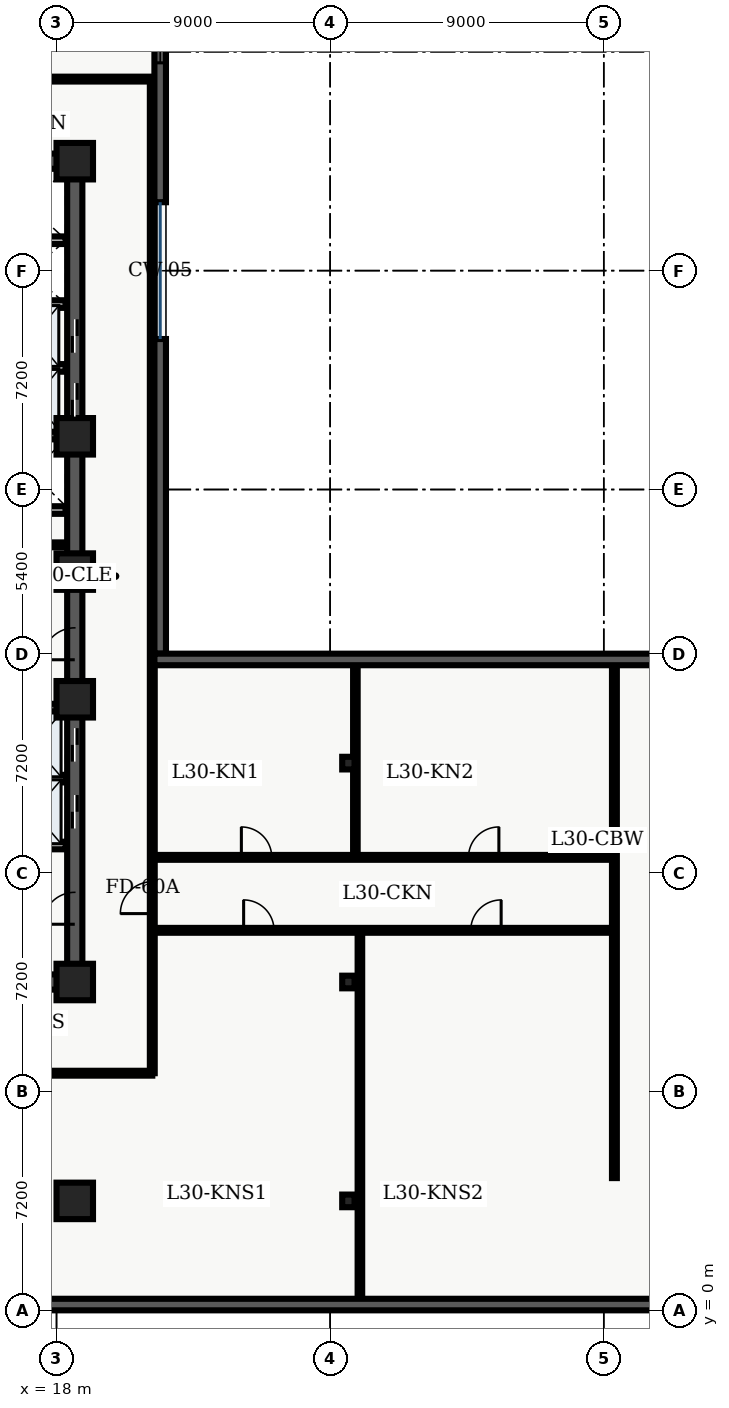
"""IFC4 building model, lengths in metres.
Left out: names, types, materials, properties, quantities, classifications, styles, units other than length and angle.
Written with IfcOpenShell. Run it as: python <this file> out.ifc"""

import sys

from ifc_helpers import new_model, entity, si_unit, converted_unit, direction, frame, origin_with_axes, origin_2d_with_axis, place, context, subcontext, project, spatial, polyline, rectangle, i_section, outline, extrude, element, fill, save


model = new_model("IFC4")
c1 = context("Model", 3, precision=1e-05, world=origin_with_axes(), true_north=direction((0.0, 1.0)))
c2 = subcontext(c1, "Body", "Model", "MODEL_VIEW")
j1 = project(units=[si_unit("LENGTHUNIT", "METRE"), converted_unit("PLANEANGLEUNIT", "DEGREE", entity("IfcPlaneAngleMeasure", 0.017), si_unit("PLANEANGLEUNIT", "RADIAN"), dimensions=[0, 0, 0, 0, 0, 0, 0])], contexts=[c1])
p1 = place(None, origin_with_axes())
s1 = spatial("IfcSite", under=j1, at=p1, CompositionType="ELEMENT")
p2 = place(p1, origin_with_axes())
s2 = spatial("IfcBuilding", under=s1, at=p2, CompositionType="ELEMENT")
p3 = place(p2, frame((0.0, 0.0, 124.2), z_axis=(0.0, 0.0, 1.0), x_axis=(1.0, 0.0, 0.0)))
s3 = spatial("IfcBuildingStorey", under=s2, at=p3, CompositionType="ELEMENT", Elevation=124.2)
p4 = place(p3, frame((11.4, 10.8, 0.0), z_axis=(0.0, 0.0, 1.0), x_axis=(1.0, 0.0, 0.0)))
e1 = element("IfcWall", 1, at=p4, inside=s3, PredefinedType="SHEAR", context=c2, shape_type="SweptSolid", body=[
    extrude(outline(polyline([(0.0, -0.25), (7.2, -0.25), (7.2, 0.25), (0.0, 0.25), (0.0, -0.25)])), origin_with_axes(), (0.0, 0.0, 1.0), 4.56),
])
p5 = place(p4, frame((2.625, 0.0, 0.0), z_axis=(0.0, 0.0, 1.0), x_axis=(1.0, 0.0, 0.0)))
e2 = element("IfcOpeningElement", 2, at=p5, cuts=e1, PredefinedType="OPENING", context=c2, shape_type="SweptSolid", body=[
    extrude(rectangle(XDim=1.05, YDim=0.52, at=origin_2d_with_axis()), origin_with_axes(), (0.0, 0.0, 1.0), 2.15),
])
p6 = place(p3, frame((11.4, 37.8, 0.0), z_axis=(0.0, 0.0, 1.0), x_axis=(1.0, 0.0, 0.0)))
e3 = element("IfcWall", 3, at=p6, inside=s3, PredefinedType="SHEAR", context=c2, shape_type="SweptSolid", body=[
    extrude(outline(polyline([(0.0, -0.25), (7.2, -0.25), (7.2, 0.25), (0.0, 0.25), (0.0, -0.25)])), origin_with_axes(), (0.0, 0.0, 1.0), 4.56),
])
p7 = place(p6, frame((2.625, 0.0, 0.0), z_axis=(0.0, 0.0, 1.0), x_axis=(1.0, 0.0, 0.0)))
e4 = element("IfcOpeningElement", 4, at=p7, cuts=e3, PredefinedType="OPENING", context=c2, shape_type="SweptSolid", body=[
    extrude(rectangle(XDim=1.05, YDim=0.52, at=origin_2d_with_axis()), origin_with_axes(), (0.0, 0.0, 1.0), 2.15),
])
p8 = place(p3, frame((18.6, 10.8, 0.0), z_axis=(0.0, 0.0, 1.0), x_axis=(0.0, 1.0, 0.0)))
e5 = element("IfcWall", 5, at=p8, inside=s3, PredefinedType="SHEAR", context=c2, shape_type="SweptSolid", body=[
    extrude(outline(polyline([(0.0, -0.25), (13.5, -0.25), (13.5, 0.25), (0.0, 0.25), (0.0, -0.25)])), origin_with_axes(), (0.0, 0.0, 1.0), 4.56),
])
p9 = place(p8, frame((5.6, 0.0, 0.0), z_axis=(0.0, 0.0, 1.0), x_axis=(1.0, 0.0, 0.0)))
e6 = element("IfcOpeningElement", 6, at=p9, cuts=e5, PredefinedType="OPENING", context=c2, shape_type="SweptSolid", body=[
    extrude(rectangle(XDim=1.1, YDim=0.52, at=origin_2d_with_axis()), origin_with_axes(), (0.0, 0.0, 1.0), 2.15),
])
p10 = place(p8, frame((7.8, 0.0, 0.0), z_axis=(0.0, 0.0, 1.0), x_axis=(1.0, 0.0, 0.0)))
e7 = element("IfcOpeningElement", 7, at=p10, cuts=e5, PredefinedType="OPENING", context=c2, shape_type="SweptSolid", body=[
    extrude(rectangle(XDim=1.1, YDim=0.52, at=origin_2d_with_axis()), origin_with_axes(), (0.0, 0.0, 1.0), 2.15),
])
p11 = place(p8, frame((11.125, 0.0, 0.0), z_axis=(0.0, 0.0, 1.0), x_axis=(1.0, 0.0, 0.0)))
e8 = element("IfcOpeningElement", 8, at=p11, cuts=e5, PredefinedType="OPENING", context=c2, shape_type="SweptSolid", body=[
    extrude(rectangle(XDim=1.05, YDim=0.52, at=origin_2d_with_axis()), origin_with_axes(), (0.0, 0.0, 1.0), 2.15),
])
p12 = place(p8, frame((2.425, 0.0, 0.0), z_axis=(0.0, 0.0, 1.0), x_axis=(1.0, 0.0, 0.0)))
e9 = element("IfcOpeningElement", 9, at=p12, cuts=e5, PredefinedType="OPENING", context=c2, shape_type="SweptSolid", body=[
    extrude(rectangle(XDim=1.05, YDim=0.52, at=origin_2d_with_axis()), origin_with_axes(), (0.0, 0.0, 1.0), 2.15),
])
p13 = place(p3, frame((18.6, 24.3, 0.0), z_axis=(0.0, 0.0, 1.0), x_axis=(0.0, 1.0, 0.0)))
e10 = element("IfcWall", 10, at=p13, inside=s3, PredefinedType="SHEAR", context=c2, shape_type="SweptSolid", body=[
    extrude(outline(polyline([(0.0, -0.25), (13.5, -0.25), (13.5, 0.25), (0.0, 0.25), (0.0, -0.25)])), origin_with_axes(), (0.0, 0.0, 1.0), 4.56),
])
p14 = place(p13, frame((5.65, 0.0, 0.0), z_axis=(0.0, 0.0, 1.0), x_axis=(1.0, 0.0, 0.0)))
e11 = element("IfcOpeningElement", 11, at=p14, cuts=e10, PredefinedType="OPENING", context=c2, shape_type="SweptSolid", body=[
    extrude(rectangle(XDim=1.1, YDim=0.52, at=origin_2d_with_axis()), origin_with_axes(), (0.0, 0.0, 1.0), 2.15),
])
p15 = place(p13, frame((7.75, 0.0, 0.0), z_axis=(0.0, 0.0, 1.0), x_axis=(1.0, 0.0, 0.0)))
e12 = element("IfcOpeningElement", 12, at=p15, cuts=e10, PredefinedType="OPENING", context=c2, shape_type="SweptSolid", body=[
    extrude(rectangle(XDim=1.1, YDim=0.52, at=origin_2d_with_axis()), origin_with_axes(), (0.0, 0.0, 1.0), 2.15),
])
for number, where, z_axis, x_axis in (
    (13, (11.65, 19.825, 0.0), (0.0, 0.0, 1.0), (1.0, 0.0, 0.0)),
    (14, (11.65, 28.775, 0.0), (0.0, 0.0, 1.0), (1.0, 0.0, 0.0)),
):
    element("IfcWall", number, at=place(p3, frame(where, z_axis=z_axis, x_axis=x_axis)), inside=s3, PredefinedType="SHEAR", context=c2, shape_type="SweptSolid", body=[
        extrude(outline(polyline([(0.0, -0.125), (6.7, -0.125), (6.7, 0.125), (0.0, 0.125), (0.0, -0.125)])), origin_with_axes(), (0.0, 0.0, 1.0), 4.56),
    ])
p16 = place(p3, frame((11.7, 24.1, 0.0), z_axis=(0.0, 0.0, 1.0), x_axis=(1.0, 0.0, 0.0)))
e15 = element("IfcWall", 15, at=p16, inside=s3, PredefinedType="SOLIDWALL", context=c2, shape_type="SweptSolid", body=[
    extrude(outline(polyline([(0.0, -0.125), (6.6, -0.125), (6.6, 0.125), (0.0, 0.125), (0.0, -0.125)])), origin_with_axes(), (0.0, 0.0, 1.0), 3.6),
])
p17 = place(p16, frame((3.75, 0.0, 0.0), z_axis=(0.0, 0.0, 1.0), x_axis=(1.0, 0.0, 0.0)))
e16 = element("IfcOpeningElement", 16, at=p17, cuts=e15, PredefinedType="OPENING", context=c2, shape_type="SweptSolid", body=[
    extrude(rectangle(XDim=0.9, YDim=0.27, at=origin_2d_with_axis()), origin_with_axes(), (0.0, 0.0, 1.0), 2.15),
])
p18 = place(p3, frame((11.7, 26.325, 0.0), z_axis=(0.0, 0.0, 1.0), x_axis=(1.0, 0.0, 0.0)))
e17 = element("IfcWall", 17, at=p18, inside=s3, PredefinedType="SOLIDWALL", context=c2, shape_type="SweptSolid", body=[
    extrude(outline(polyline([(0.0, -0.125), (6.6, -0.125), (6.6, 0.125), (0.0, 0.125), (0.0, -0.125)])), origin_with_axes(), (0.0, 0.0, 1.0), 3.6),
])
p19 = place(p18, frame((3.5, 0.0, 0.0), z_axis=(0.0, 0.0, 1.0), x_axis=(1.0, 0.0, 0.0)))
e18 = element("IfcOpeningElement", 18, at=p19, cuts=e17, PredefinedType="OPENING", context=c2, shape_type="SweptSolid", body=[
    extrude(rectangle(XDim=0.9, YDim=0.27, at=origin_2d_with_axis()), origin_with_axes(), (0.0, 0.0, 1.0), 2.15),
])
for number, where, z_axis, x_axis in (
    (19, (18.6, 3.6, 0.0), (0.0, 0.0, 1.0), (1.0, 0.0, 0.0)),
    (20, (18.6, 10.8, 0.0), (0.0, 0.0, 1.0), (1.0, 0.0, 0.0)),
    (21, (18.6, 20.1, 0.0), (0.0, 0.0, 1.0), (1.0, 0.0, 0.0)),
    (22, (18.6, 24.3, 0.0), (0.0, 0.0, 1.0), (1.0, 0.0, 0.0)),
    (23, (18.6, 28.75, 0.0), (0.0, 0.0, 1.0), (1.0, 0.0, 0.0)),
    (24, (18.6, 37.8, 0.0), (0.0, 0.0, 1.0), (1.0, 0.0, 0.0)),
):
    element("IfcColumn", number, at=place(p3, frame(where, z_axis=z_axis, x_axis=x_axis)), inside=s3, PredefinedType="COLUMN", context=c2, shape_type="SweptSolid", body=[
        extrude(rectangle(XDim=1.2, YDim=1.2, at=origin_2d_with_axis()), origin_with_axes(), (0.0, 0.0, 1.0), 4.8),
    ])
for number, where, z_axis, x_axis in (
    (25, (27.6, 3.6, 0.0), (0.0, 0.0, 1.0), (1.0, 0.0, 0.0)),
    (26, (27.6, 10.8, 0.0), (0.0, 0.0, 1.0), (1.0, 0.0, 0.0)),
    (27, (27.6, 18.0, 0.0), (0.0, 0.0, 1.0), (1.0, 0.0, 0.0)),
):
    element("IfcColumn", number, at=place(p3, frame(where, z_axis=z_axis, x_axis=x_axis)), inside=s3, PredefinedType="COLUMN", context=c2, shape_type="SweptSolid", body=[
        extrude(i_section(OverallWidth=0.406, OverallDepth=0.416, WebThickness=0.03, FlangeThickness=0.048, FilletRadius=0.022, at=origin_2d_with_axis()), origin_with_axes(), (0.0, 0.0, 1.0), 4.8),
    ])
p20 = place(p3, frame((14.62, 25.18, 0.0), z_axis=(0.0, 0.0, 1.0), x_axis=(1.0, 0.0, 0.0)))
e28 = element("IfcWall", 28, at=p20, inside=s3, PredefinedType="PARTITIONING", context=c2, shape_type="SweptSolid", body=[
    extrude(outline(polyline([(0.0, -0.08), (3.68, -0.08), (3.68, 0.08), (0.0, 0.08), (0.0, -0.08)])), origin_with_axes(), (0.0, 0.0, 1.0), 3.2),
])
p21 = place(p20, frame((1.95, 0.0, 0.0), z_axis=(0.0, 0.0, 1.0), x_axis=(1.0, 0.0, 0.0)))
e29 = element("IfcOpeningElement", 29, at=p21, cuts=e28, PredefinedType="OPENING", context=c2, shape_type="SweptSolid", body=[
    extrude(rectangle(XDim=0.9, YDim=0.18, at=origin_2d_with_axis()), origin_with_axes(), (0.0, 0.0, 1.0), 2.15),
])
for number, where, z_axis, x_axis in (
    (30, (15.84, 15.29, 0.0), (0.0, 0.0, 1.0), (1.0, 0.0, 0.0)),
    (31, (15.84, 17.49, 0.0), (0.0, 0.0, 1.0), (1.0, 0.0, 0.0)),
    (32, (15.84, 31.0, 0.0), (0.0, 0.0, 1.0), (1.0, 0.0, 0.0)),
    (33, (15.84, 33.1, 0.0), (0.0, 0.0, 1.0), (1.0, 0.0, 0.0)),
    (34, (15.84, 35.2, 0.0), (0.0, 0.0, 1.0), (1.0, 0.0, 0.0)),
):
    element("IfcWall", number, at=place(p3, frame(where, z_axis=z_axis, x_axis=x_axis)), inside=s3, PredefinedType="SOLIDWALL", context=c2, shape_type="SweptSolid", body=[
        extrude(outline(polyline([(0.0, -0.125), (2.46, -0.125), (2.46, 0.125), (0.0, 0.125), (0.0, -0.125)])), origin_with_axes(), (0.0, 0.0, 1.0), 3.2),
    ])
p22 = place(p3, frame((2.6, 7.8, 0.0), z_axis=(0.0, 0.0, 1.0), x_axis=(1.0, 0.0, 0.0)))
e35 = element("IfcWall", 35, at=p22, inside=s3, PredefinedType="PARTITIONING", context=c2, shape_type="SweptSolid", body=[
    extrude(outline(polyline([(0.0, -0.08), (18.55, -0.08), (18.55, 0.08), (0.0, 0.08), (0.0, -0.08)])), origin_with_axes(), (0.0, 0.0, 1.0), 3.2),
])
p23 = place(p22, frame((3.684, 0.0, 0.0), z_axis=(0.0, 0.0, 1.0), x_axis=(1.0, 0.0, 0.0)))
e36 = element("IfcOpeningElement", 36, at=p23, cuts=e35, PredefinedType="OPENING", context=c2, shape_type="SweptSolid", body=[
    extrude(rectangle(XDim=1.0, YDim=0.18, at=origin_2d_with_axis()), origin_with_axes(), (0.0, 0.0, 1.0), 2.15),
])
p24 = place(p22, frame((13.22, 0.0, 0.0), z_axis=(0.0, 0.0, 1.0), x_axis=(1.0, 0.0, 0.0)))
e37 = element("IfcOpeningElement", 37, at=p24, cuts=e35, PredefinedType="OPENING", context=c2, shape_type="SweptSolid", body=[
    extrude(rectangle(XDim=1.0, YDim=0.18, at=origin_2d_with_axis()), origin_with_axes(), (0.0, 0.0, 1.0), 2.15),
])
p25 = place(p3, frame((2.6, 40.5, 0.0), z_axis=(0.0, 0.0, 1.0), x_axis=(1.0, 0.0, 0.0)))
e38 = element("IfcWall", 38, at=p25, inside=s3, PredefinedType="PARTITIONING", context=c2, shape_type="SweptSolid", body=[
    extrude(outline(polyline([(0.0, -0.08), (18.65, -0.08), (18.65, 0.08), (0.0, 0.08), (0.0, -0.08)])), origin_with_axes(), (0.0, 0.0, 1.0), 3.2),
])
p26 = place(p25, frame((4.395, 0.0, 0.0), z_axis=(0.0, 0.0, 1.0), x_axis=(1.0, 0.0, 0.0)))
e39 = element("IfcOpeningElement", 39, at=p26, cuts=e38, PredefinedType="OPENING", context=c2, shape_type="SweptSolid", body=[
    extrude(rectangle(XDim=1.0, YDim=0.18, at=origin_2d_with_axis()), origin_with_axes(), (0.0, 0.0, 1.0), 2.15),
])
p27 = place(p25, frame((12.61, 0.0, 0.0), z_axis=(0.0, 0.0, 1.0), x_axis=(1.0, 0.0, 0.0)))
e40 = element("IfcOpeningElement", 40, at=p27, cuts=e38, PredefinedType="OPENING", context=c2, shape_type="SweptSolid", body=[
    extrude(rectangle(XDim=1.0, YDim=0.18, at=origin_2d_with_axis()), origin_with_axes(), (0.0, 0.0, 1.0), 2.15),
])
p28 = place(p3, frame((21.15, 7.8, 0.0), z_axis=(0.0, 0.0, 1.0), x_axis=(0.0, 1.0, 0.0)))
e41 = element("IfcWall", 41, at=p28, inside=s3, PredefinedType="PARTITIONING", context=c2, shape_type="SweptSolid", body=[
    extrude(outline(polyline([(0.0, -0.08), (32.7, -0.08), (32.7, 0.08), (0.0, 0.08), (0.0, -0.08)])), origin_with_axes(), (0.0, 0.0, 1.0), 3.2),
])
p29 = place(p28, frame((5.775, 0.0, 0.0), z_axis=(0.0, 0.0, 1.0), x_axis=(1.0, 0.0, 0.0)))
e42 = element("IfcOpeningElement", 42, at=p29, cuts=e41, PredefinedType="OPENING", context=c2, shape_type="SweptSolid", body=[
    extrude(rectangle(XDim=1.05, YDim=0.18, at=origin_2d_with_axis()), origin_with_axes(), (0.0, 0.0, 1.0), 2.15),
])
p30 = place(p3, frame((21.15, 12.5, 0.0), z_axis=(0.0, 0.0, 1.0), x_axis=(1.0, 0.0, 0.0)))
e43 = element("IfcWall", 43, at=p30, inside=s3, PredefinedType="PARTITIONING", context=c2, shape_type="SweptSolid", body=[
    extrude(outline(polyline([(0.0, -0.08), (15.2, -0.08), (15.2, 0.08), (0.0, 0.08), (0.0, -0.08)])), origin_with_axes(), (0.0, 0.0, 1.0), 3.2),
])
p31 = place(p30, frame((3.505, 0.0, 0.0), z_axis=(0.0, 0.0, 1.0), x_axis=(1.0, 0.0, 0.0)))
e44 = element("IfcOpeningElement", 44, at=p31, cuts=e43, PredefinedType="OPENING", context=c2, shape_type="SweptSolid", body=[
    extrude(rectangle(XDim=1.0, YDim=0.18, at=origin_2d_with_axis()), origin_with_axes(), (0.0, 0.0, 1.0), 2.15),
])
p32 = place(p30, frame((10.975, 0.0, 0.0), z_axis=(0.0, 0.0, 1.0), x_axis=(1.0, 0.0, 0.0)))
e45 = element("IfcOpeningElement", 45, at=p32, cuts=e43, PredefinedType="OPENING", context=c2, shape_type="SweptSolid", body=[
    extrude(rectangle(XDim=1.0, YDim=0.18, at=origin_2d_with_axis()), origin_with_axes(), (0.0, 0.0, 1.0), 2.15),
])
p33 = place(p3, frame((21.15, 14.9, 0.0), z_axis=(0.0, 0.0, 1.0), x_axis=(1.0, 0.0, 0.0)))
e46 = element("IfcWall", 46, at=p33, inside=s3, PredefinedType="PARTITIONING", context=c2, shape_type="SweptSolid", body=[
    extrude(outline(polyline([(0.0, -0.08), (15.2, -0.08), (15.2, 0.08), (0.0, 0.08), (0.0, -0.08)])), origin_with_axes(), (0.0, 0.0, 1.0), 3.2),
])
p34 = place(p33, frame((3.43, 0.0, 0.0), z_axis=(0.0, 0.0, 1.0), x_axis=(1.0, 0.0, 0.0)))
e47 = element("IfcOpeningElement", 47, at=p34, cuts=e46, PredefinedType="OPENING", context=c2, shape_type="SweptSolid", body=[
    extrude(rectangle(XDim=1.0, YDim=0.18, at=origin_2d_with_axis()), origin_with_axes(), (0.0, 0.0, 1.0), 2.15),
])
p35 = place(p33, frame((10.9, 0.0, 0.0), z_axis=(0.0, 0.0, 1.0), x_axis=(1.0, 0.0, 0.0)))
e48 = element("IfcOpeningElement", 48, at=p35, cuts=e46, PredefinedType="OPENING", context=c2, shape_type="SweptSolid", body=[
    extrude(rectangle(XDim=1.0, YDim=0.18, at=origin_2d_with_axis()), origin_with_axes(), (0.0, 0.0, 1.0), 2.15),
])
p36 = place(p3, frame((36.35, 4.35, 0.0), z_axis=(0.0, 0.0, 1.0), x_axis=(0.0, 1.0, 0.0)))
e49 = element("IfcWall", 49, at=p36, inside=s3, PredefinedType="PARTITIONING", context=c2, shape_type="SweptSolid", body=[
    extrude(outline(polyline([(0.0, -0.08), (16.95, -0.08), (16.95, 0.08), (0.0, 0.08), (0.0, -0.08)])), origin_with_axes(), (0.0, 0.0, 1.0), 3.2),
])
p37 = place(p3, frame((27.979, 0.36, 0.0), z_axis=(0.0, 0.0, 1.0), x_axis=(0.0, 1.0, 0.0)))
e50 = element("IfcWall", 50, at=p37, inside=s3, PredefinedType="PARTITIONING", context=c2, shape_type="SweptSolid", body=[
    extrude(outline(polyline([(0.0, -0.075), (12.02, -0.075), (12.02, 0.075), (0.0, 0.075), (0.0, -0.075)])), origin_with_axes(), (0.0, 0.0, 1.0), 3.2),
])
p38 = place(p3, frame((27.83, 15.02, 0.0), z_axis=(0.0, 0.0, 1.0), x_axis=(0.0, 1.0, 0.0)))
e51 = element("IfcWall", 51, at=p38, inside=s3, PredefinedType="PARTITIONING", context=c2, shape_type="SweptSolid", body=[
    extrude(outline(polyline([(0.0, -0.075), (6.205, -0.075), (6.205, 0.075), (0.0, 0.075), (0.0, -0.075)])), origin_with_axes(), (0.0, 0.0, 1.0), 3.2),
])
p39 = place(p3, frame((57.22, 0.19, 0.0), z_axis=(0.0, 0.0, 1.0), x_axis=(-1.0, 0.0, 0.0)))
e52 = element("IfcWall", 52, at=p39, inside=s3, PredefinedType="SOLIDWALL", context=c2, shape_type="SweptSolid", body=[
    extrude(outline(polyline([(0.0, -0.19), (54.82, -0.19), (54.82, 0.19), (0.0, 0.19), (0.0, -0.19)])), origin_with_axes(), (0.0, 0.0, 1.0), 4.56),
])
p40 = place(p3, frame((21.41, 46.82, 0.0), z_axis=(0.0, 0.0, 1.0), x_axis=(0.0, -1.0, 0.0)))
e53 = element("IfcWall", 53, at=p40, inside=s3, PredefinedType="SOLIDWALL", context=c2, shape_type="SweptSolid", body=[
    extrude(outline(polyline([(0.0, -0.19), (10.37, -0.19), (10.37, 0.19), (0.0, 0.19), (0.0, -0.19)])), origin_with_axes(), (0.0, 0.0, 1.0), 4.56),
])
p41 = place(p40, frame((4.735, 0.0, 0.45), z_axis=(0.0, 0.0, 1.0), x_axis=(1.0, 0.0, 0.0)))
e54 = element("IfcOpeningElement", 54, at=p41, cuts=e53, PredefinedType="OPENING", context=c2, shape_type="SweptSolid", body=[
    extrude(rectangle(XDim=2.1, YDim=0.4, at=origin_2d_with_axis()), origin_with_axes(), (0.0, 0.0, 1.0), 2.2),
])
p42 = place(p3, frame((21.41, 31.95, 0.0), z_axis=(0.0, 0.0, 1.0), x_axis=(0.0, -1.0, 0.0)))
e55 = element("IfcWall", 55, at=p42, inside=s3, PredefinedType="SOLIDWALL", context=c2, shape_type="SweptSolid", body=[
    extrude(outline(polyline([(0.0, -0.19), (10.35, -0.19), (10.35, 0.19), (0.0, 0.19), (0.0, -0.19)])), origin_with_axes(), (0.0, 0.0, 1.0), 4.56),
])
p43 = place(p3, frame((21.22, 21.41, 0.0), z_axis=(0.0, 0.0, 1.0), x_axis=(1.0, 0.0, 0.0)))
e56 = element("IfcWall", 56, at=p43, inside=s3, PredefinedType="SOLIDWALL", context=c2, shape_type="SweptSolid", body=[
    extrude(outline(polyline([(0.0, -0.19), (17.18, -0.19), (17.18, 0.19), (0.0, 0.19), (0.0, -0.19)])), origin_with_axes(), (0.0, 0.0, 1.0), 4.56),
])
p44 = place(p8, frame((5.6, 0.0, 0.0), z_axis=(0.0, 0.0, 1.0), x_axis=(1.0, 0.0, 0.0)))
e57 = element("IfcDoor", 57, at=p44, inside=s3, OperationType="DOUBLE_DOOR_SLIDING", PredefinedType="DOOR", context=c2, shape_type="SweptSolid", body=[
    extrude(rectangle(XDim=1.1, YDim=0.09, at=origin_2d_with_axis()), origin_with_axes(), (0.0, 0.0, 1.0), 2.15),
])
fill(e6, e57)
p45 = place(p8, frame((7.8, 0.0, 0.0), z_axis=(0.0, 0.0, 1.0), x_axis=(1.0, 0.0, 0.0)))
e58 = element("IfcDoor", 58, at=p45, inside=s3, OperationType="DOUBLE_DOOR_SLIDING", PredefinedType="DOOR", context=c2, shape_type="SweptSolid", body=[
    extrude(rectangle(XDim=1.1, YDim=0.09, at=origin_2d_with_axis()), origin_with_axes(), (0.0, 0.0, 1.0), 2.15),
])
fill(e7, e58)
p46 = place(p13, frame((5.65, 0.0, 0.0), z_axis=(0.0, 0.0, 1.0), x_axis=(1.0, 0.0, 0.0)))
e59 = element("IfcDoor", 59, at=p46, inside=s3, OperationType="SLIDING_TO_LEFT", PredefinedType="DOOR", context=c2, shape_type="SweptSolid", body=[
    extrude(rectangle(XDim=1.1, YDim=0.09, at=origin_2d_with_axis()), origin_with_axes(), (0.0, 0.0, 1.0), 2.15),
])
fill(e11, e59)
p47 = place(p13, frame((7.75, 0.0, 0.0), z_axis=(0.0, 0.0, 1.0), x_axis=(1.0, 0.0, 0.0)))
e60 = element("IfcDoor", 60, at=p47, inside=s3, OperationType="SLIDING_TO_RIGHT", PredefinedType="DOOR", context=c2, shape_type="SweptSolid", body=[
    extrude(rectangle(XDim=1.1, YDim=0.09, at=origin_2d_with_axis()), origin_with_axes(), (0.0, 0.0, 1.0), 2.15),
])
fill(e12, e60)
p48 = place(p8, frame((11.125, 0.0, 0.0), z_axis=(0.0, 0.0, 1.0), x_axis=(1.0, 0.0, 0.0)))
e61 = element("IfcDoor", 61, at=p48, inside=s3, OperationType="SINGLE_SWING_LEFT", PredefinedType="DOOR", context=c2, shape_type="SweptSolid", body=[
    extrude(rectangle(XDim=1.05, YDim=0.09, at=origin_2d_with_axis()), origin_with_axes(), (0.0, 0.0, 1.0), 2.15),
])
fill(e8, e61)
p49 = place(p8, frame((2.425, 0.0, 0.0), z_axis=(0.0, 0.0, 1.0), x_axis=(1.0, 0.0, 0.0)))
e62 = element("IfcDoor", 62, at=p49, inside=s3, OperationType="SINGLE_SWING_LEFT", PredefinedType="DOOR", context=c2, shape_type="SweptSolid", body=[
    extrude(rectangle(XDim=1.05, YDim=0.09, at=origin_2d_with_axis()), origin_with_axes(), (0.0, 0.0, 1.0), 2.15),
])
fill(e9, e62)
p50 = place(p28, frame((5.775, 0.0, 0.0), z_axis=(0.0, 0.0, 1.0), x_axis=(1.0, 0.0, 0.0)))
e63 = element("IfcDoor", 63, at=p50, inside=s3, OperationType="SINGLE_SWING_LEFT", PredefinedType="DOOR", context=c2, shape_type="SweptSolid", body=[
    extrude(rectangle(XDim=1.05, YDim=0.09, at=origin_2d_with_axis()), origin_with_axes(), (0.0, 0.0, 1.0), 2.15),
])
fill(e42, e63)
p51 = place(p30, frame((3.505, 0.0, 0.0), z_axis=(0.0, 0.0, 1.0), x_axis=(1.0, 0.0, 0.0)))
e64 = element("IfcDoor", 64, at=p51, inside=s3, OperationType="SINGLE_SWING_LEFT", PredefinedType="DOOR", context=c2, shape_type="SweptSolid", body=[
    extrude(rectangle(XDim=1.0, YDim=0.09, at=origin_2d_with_axis()), origin_with_axes(), (0.0, 0.0, 1.0), 2.15),
])
fill(e44, e64)
p52 = place(p30, frame((10.975, 0.0, 0.0), z_axis=(0.0, 0.0, 1.0), x_axis=(1.0, 0.0, 0.0)))
e65 = element("IfcDoor", 65, at=p52, inside=s3, OperationType="SINGLE_SWING_RIGHT", PredefinedType="DOOR", context=c2, shape_type="SweptSolid", body=[
    extrude(rectangle(XDim=1.0, YDim=0.09, at=origin_2d_with_axis()), origin_with_axes(), (0.0, 0.0, 1.0), 2.15),
])
fill(e45, e65)
p53 = place(p33, frame((3.43, 0.0, 0.0), z_axis=(0.0, 0.0, 1.0), x_axis=(1.0, 0.0, 0.0)))
e66 = element("IfcDoor", 66, at=p53, inside=s3, OperationType="SINGLE_SWING_LEFT", PredefinedType="DOOR", context=c2, shape_type="SweptSolid", body=[
    extrude(rectangle(XDim=1.0, YDim=0.09, at=origin_2d_with_axis()), origin_with_axes(), (0.0, 0.0, 1.0), 2.15),
])
fill(e47, e66)
p54 = place(p33, frame((10.9, 0.0, 0.0), z_axis=(0.0, 0.0, 1.0), x_axis=(1.0, 0.0, 0.0)))
e67 = element("IfcDoor", 67, at=p54, inside=s3, OperationType="SINGLE_SWING_RIGHT", PredefinedType="DOOR", context=c2, shape_type="SweptSolid", body=[
    extrude(rectangle(XDim=1.0, YDim=0.09, at=origin_2d_with_axis()), origin_with_axes(), (0.0, 0.0, 1.0), 2.15),
])
fill(e48, e67)
p55 = place(p40, frame((4.735, 0.0, 0.45), z_axis=(0.0, 0.0, 1.0), x_axis=(1.0, 0.0, 0.0)))
e68 = element("IfcWindow", 68, at=p55, inside=s3, PredefinedType="WINDOW", context=c2, shape_type="SweptSolid", body=[
    extrude(rectangle(XDim=2.1, YDim=0.09, at=origin_2d_with_axis()), origin_with_axes(), (0.0, 0.0, 1.0), 2.2),
])
fill(e54, e68)
save(model, sys.argv[1])
